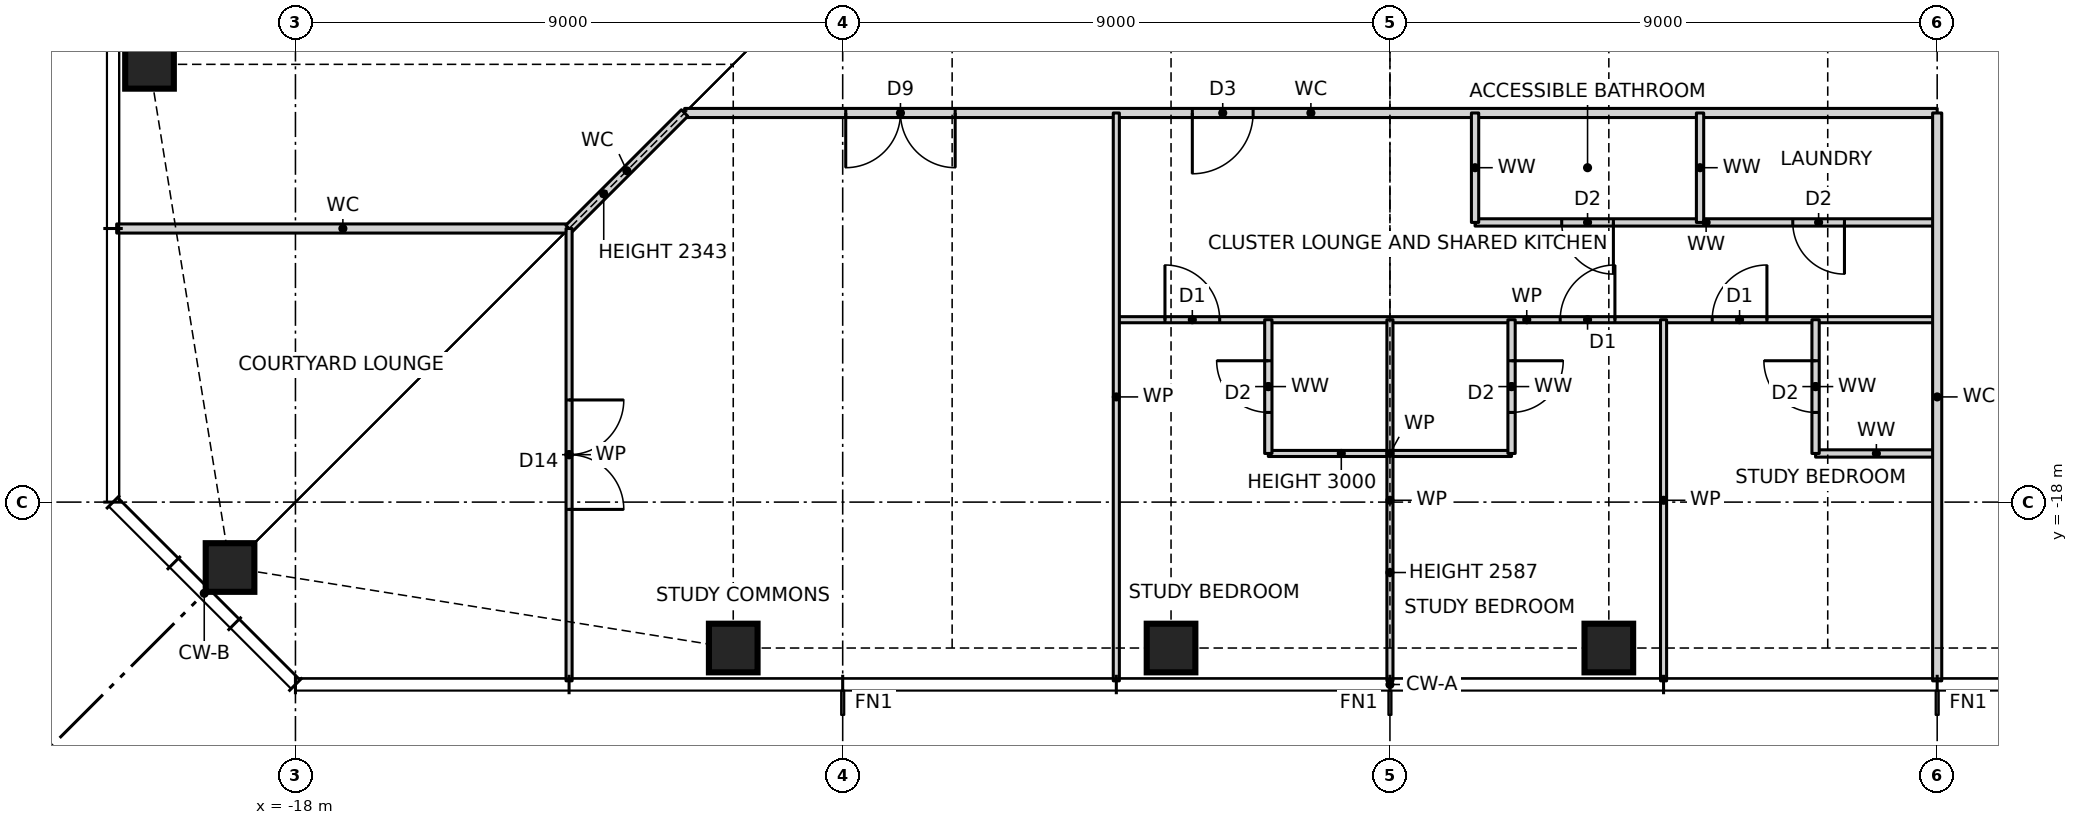
"""IFC4 building model, lengths in metres.
Left out: names, types, materials, properties, quantities, classifications, styles, units other than length and angle.
Written with IfcOpenShell. Run it as: python <this file> out.ifc"""

import sys

from ifc_helpers import new_model, si_unit, direction, frame, frame_2d, origin, origin_2d, place, context, subcontext, project, spatial, rectangle, hollow_rectangle, extrude, element, fill, save


model = new_model("IFC4")
c1 = context("Model", 3, precision=1e-05, world=origin(), true_north=direction((0.0, 1.0)))
c2 = subcontext(c1, "Body", "Model", "MODEL_VIEW")
j1 = project(units=[si_unit("LENGTHUNIT", "METRE"), si_unit("PLANEANGLEUNIT", "RADIAN")], contexts=[c1])
p1 = place(None, origin())
s1 = spatial("IfcSite", under=j1, at=p1, CompositionType="ELEMENT")
p2 = place(p1, origin())
s2 = spatial("IfcBuilding", under=s1, at=p2, CompositionType="ELEMENT")
p3 = place(p2, frame((0.0, 0.0, 133.0)))
s3 = spatial("IfcBuildingStorey", under=s2, at=p3, CompositionType="ELEMENT", Elevation=133.0)
for number, where, z_axis, x_axis in (
    (1, (-19.076, -19.076, 0.0), (0.0, 0.0, 1.0), (1.0, 0.0, 0.0)),
    (2, (-10.8, -20.4, 0.0), (0.0, 0.0, 1.0), (1.0, 0.0, 0.0)),
    (3, (-3.6, -20.4, 0.0), (0.0, 0.0, 1.0), (1.0, 0.0, 0.0)),
    (4, (3.6, -20.4, 0.0), (0.0, 0.0, 1.0), (1.0, 0.0, 0.0)),
    (5, (-20.4, -10.8, 0.0), (0.0, 0.0, 1.0), (1.0, 0.0, 0.0)),
):
    element("IfcColumn", number, at=place(p3, frame(where, z_axis=z_axis, x_axis=x_axis)), inside=s3, PredefinedType="COLUMN", context=c2, shape_type="SweptSolid", body=[
        extrude(hollow_rectangle(XDim=0.8, YDim=0.8, WallThickness=0.07, at=origin_2d()), origin(), (0.0, 0.0, 1.0), 3.5),
    ])
p4 = place(p3, frame((-2.0, -17.2, 0.0), z_axis=(0.0, 0.0, 1.0), x_axis=(1.0, 0.0, 0.0)))
e6 = element("IfcWall", 6, at=p4, inside=s3, PredefinedType="PARTITIONING", context=c2, shape_type="SweptSolid", body=[
    extrude(rectangle(XDim=4.0, YDim=0.1, at=frame_2d((2.0, 0.0))), origin(), (0.0, 0.0, 1.0), 3.0),
])
p5 = place(p3, frame((7.0, -17.2, 0.0), z_axis=(0.0, 0.0, 1.0), x_axis=(1.0, 0.0, 0.0)))
e7 = element("IfcWall", 7, at=p5, inside=s3, PredefinedType="PARTITIONING", context=c2, shape_type="SweptSolid", body=[
    extrude(rectangle(XDim=2.0, YDim=0.12, at=frame_2d((1.0, 0.0))), origin(), (0.0, 0.0, 1.0), 3.27),
])
p6 = place(p3, frame((-4.5, -15.0, 0.0), z_axis=(0.0, 0.0, 1.0), x_axis=(1.0, 0.0, 0.0)))
e8 = element("IfcWall", 8, at=p6, inside=s3, PredefinedType="PARTITIONING", context=c2, shape_type="SweptSolid", body=[
    extrude(rectangle(XDim=13.5, YDim=0.1, at=frame_2d((6.75, 0.0))), origin(), (0.0, 0.0, 1.0), 3.27),
])
p7 = place(p6, frame((0.8, 0.0, 0.0)))
e9 = element("IfcOpeningElement", 9, at=p7, cuts=e8, PredefinedType="OPENING", context=c2, shape_type="SweptSolid", body=[
    extrude(rectangle(XDim=0.9, YDim=2.1, at=frame_2d((0.45, 1.05))), frame((0.0, 0.06, 0.0), z_axis=(0.0, -1.0, 0.0), x_axis=(1.0, 0.0, 0.0)), (0.0, 0.0, 1.0), 0.12),
])
p8 = place(p6, frame((7.3, 0.0, 0.0)))
e10 = element("IfcOpeningElement", 10, at=p8, cuts=e8, PredefinedType="OPENING", context=c2, shape_type="SweptSolid", body=[
    extrude(rectangle(XDim=0.9, YDim=2.1, at=frame_2d((0.45, 1.05))), frame((0.0, 0.06, 0.0), z_axis=(0.0, -1.0, 0.0), x_axis=(1.0, 0.0, 0.0)), (0.0, 0.0, 1.0), 0.12),
])
p9 = place(p6, frame((9.8, 0.0, 0.0)))
e11 = element("IfcOpeningElement", 11, at=p9, cuts=e8, PredefinedType="OPENING", context=c2, shape_type="SweptSolid", body=[
    extrude(rectangle(XDim=0.9, YDim=2.1, at=frame_2d((0.45, 1.05))), frame((0.0, 0.06, 0.0), z_axis=(0.0, -1.0, 0.0), x_axis=(1.0, 0.0, 0.0)), (0.0, 0.0, 1.0), 0.12),
])
p10 = place(p3, frame((-20.94, -13.5, 0.0), z_axis=(0.0, 0.0, 1.0), x_axis=(1.0, 0.0, 0.0)))
e12 = element("IfcWall", 12, at=p10, inside=s3, PredefinedType="PARTITIONING", context=c2, shape_type="SweptSolid", body=[
    extrude(rectangle(XDim=7.44, YDim=0.15, at=frame_2d((3.72, 0.0))), origin(), (0.0, 0.0, 1.0), 3.27),
])
p11 = place(p3, frame((1.4, -13.4, 0.0), z_axis=(0.0, 0.0, 1.0), x_axis=(1.0, 0.0, 0.0)))
e13 = element("IfcWall", 13, at=p11, inside=s3, PredefinedType="PARTITIONING", context=c2, shape_type="SweptSolid", body=[
    extrude(rectangle(XDim=7.6, YDim=0.12, at=frame_2d((3.8, 0.0))), origin(), (0.0, 0.0, 1.0), 3.27),
])
p12 = place(p11, frame((1.425, 0.0, 0.0)))
e14 = element("IfcOpeningElement", 14, at=p12, cuts=e13, PredefinedType="OPENING", context=c2, shape_type="SweptSolid", body=[
    extrude(rectangle(XDim=0.85, YDim=2.1, at=frame_2d((0.425, 1.05))), frame((0.0, 0.07, 0.0), z_axis=(0.0, -1.0, 0.0), x_axis=(1.0, 0.0, 0.0)), (0.0, 0.0, 1.0), 0.14),
])
p13 = place(p11, frame((5.225, 0.0, 0.0)))
e15 = element("IfcOpeningElement", 15, at=p13, cuts=e13, PredefinedType="OPENING", context=c2, shape_type="SweptSolid", body=[
    extrude(rectangle(XDim=0.85, YDim=2.1, at=frame_2d((0.425, 1.05))), frame((0.0, 0.07, 0.0), z_axis=(0.0, -1.0, 0.0), x_axis=(1.0, 0.0, 0.0)), (0.0, 0.0, 1.0), 0.14),
])
p14 = place(p3, frame((-11.6, -11.6, 0.0), z_axis=(0.0, 0.0, 1.0), x_axis=(1.0, 0.0, 0.0)))
e16 = element("IfcWall", 16, at=p14, inside=s3, PredefinedType="PARTITIONING", context=c2, shape_type="SweptSolid", body=[
    extrude(rectangle(XDim=20.6, YDim=0.15, at=frame_2d((10.3, 0.0))), origin(), (0.0, 0.0, 1.0), 3.27),
])
p15 = place(p14, frame((2.65, 0.0, 0.0)))
e17 = element("IfcOpeningElement", 17, at=p15, cuts=e16, PredefinedType="OPENING", context=c2, shape_type="SweptSolid", body=[
    extrude(rectangle(XDim=1.8, YDim=2.1, at=frame_2d((0.9, 1.05))), frame((0.0, 0.085, 0.0), z_axis=(0.0, -1.0, 0.0), x_axis=(1.0, 0.0, 0.0)), (0.0, 0.0, 1.0), 0.17),
])
p16 = place(p14, frame((8.35, 0.0, 0.0)))
e18 = element("IfcOpeningElement", 18, at=p16, cuts=e16, PredefinedType="OPENING", context=c2, shape_type="SweptSolid", body=[
    extrude(rectangle(XDim=1.0, YDim=2.1, at=frame_2d((0.5, 1.05))), frame((0.0, 0.085, 0.0), z_axis=(0.0, -1.0, 0.0), x_axis=(1.0, 0.0, 0.0)), (0.0, 0.0, 1.0), 0.17),
])
p17 = place(p3, frame((-13.5, -13.5, 0.0), z_axis=(0.0, 0.0, 1.0), x_axis=(0.707106781187, 0.707106781187, 0.0)))
e19 = element("IfcWall", 19, at=p17, inside=s3, PredefinedType="PARTITIONING", context=c2, shape_type="SweptSolid", body=[
    extrude(rectangle(XDim=2.687, YDim=0.15, at=frame_2d((1.343, 0.0))), origin(), (0.0, 0.0, 1.0), 2.343),
])
p18 = place(p3, frame((9.0, -20.94, 0.0), z_axis=(0.0, 0.0, 1.0), x_axis=(0.0, 1.0, 0.0)))
e20 = element("IfcWall", 20, at=p18, inside=s3, PredefinedType="PARTITIONING", context=c2, shape_type="SweptSolid", body=[
    extrude(rectangle(XDim=9.34, YDim=0.15, at=frame_2d((4.67, 0.0))), origin(), (0.0, 0.0, 1.0), 3.27),
])
p19 = place(p3, frame((7.0, -17.2, 0.0), z_axis=(0.0, 0.0, 1.0), x_axis=(0.0, 1.0, 0.0)))
e21 = element("IfcWall", 21, at=p19, inside=s3, PredefinedType="PARTITIONING", context=c2, shape_type="SweptSolid", body=[
    extrude(rectangle(XDim=2.2, YDim=0.12, at=frame_2d((1.1, 0.0))), origin(), (0.0, 0.0, 1.0), 3.27),
])
p20 = place(p19, frame((0.675, 0.0, 0.0)))
e22 = element("IfcOpeningElement", 22, at=p20, cuts=e21, PredefinedType="OPENING", context=c2, shape_type="SweptSolid", body=[
    extrude(rectangle(XDim=0.85, YDim=2.1, at=frame_2d((0.425, 1.05))), frame((0.0, 0.07, 0.0), z_axis=(0.0, -1.0, 0.0), x_axis=(1.0, 0.0, 0.0)), (0.0, 0.0, 1.0), 0.14),
])
p21 = place(p3, frame((5.1, -13.4, 0.0), z_axis=(0.0, 0.0, 1.0), x_axis=(0.0, 1.0, 0.0)))
e23 = element("IfcWall", 23, at=p21, inside=s3, PredefinedType="PARTITIONING", context=c2, shape_type="SweptSolid", body=[
    extrude(rectangle(XDim=1.8, YDim=0.12, at=frame_2d((0.9, 0.0))), origin(), (0.0, 0.0, 1.0), 3.27),
])
p22 = place(p3, frame((4.5, -20.94, 0.0), z_axis=(0.0, 0.0, 1.0), x_axis=(0.0, 1.0, 0.0)))
e24 = element("IfcWall", 24, at=p22, inside=s3, PredefinedType="PARTITIONING", context=c2, shape_type="SweptSolid", body=[
    extrude(rectangle(XDim=5.94, YDim=0.1, at=frame_2d((2.97, 0.0))), origin(), (0.0, 0.0, 1.0), 3.27),
])
p23 = place(p3, frame((2.0, -17.2, 0.0), z_axis=(0.0, 0.0, 1.0), x_axis=(0.0, 1.0, 0.0)))
e25 = element("IfcWall", 25, at=p23, inside=s3, PredefinedType="PARTITIONING", context=c2, shape_type="SweptSolid", body=[
    extrude(rectangle(XDim=2.2, YDim=0.12, at=frame_2d((1.1, 0.0))), origin(), (0.0, 0.0, 1.0), 3.27),
])
p24 = place(p23, frame((0.675, 0.0, 0.0)))
e26 = element("IfcOpeningElement", 26, at=p24, cuts=e25, PredefinedType="OPENING", context=c2, shape_type="SweptSolid", body=[
    extrude(rectangle(XDim=0.85, YDim=2.1, at=frame_2d((0.425, 1.05))), frame((0.0, 0.07, 0.0), z_axis=(0.0, -1.0, 0.0), x_axis=(1.0, 0.0, 0.0)), (0.0, 0.0, 1.0), 0.14),
])
p25 = place(p3, frame((1.4, -13.4, 0.0), z_axis=(0.0, 0.0, 1.0), x_axis=(0.0, 1.0, 0.0)))
e27 = element("IfcWall", 27, at=p25, inside=s3, PredefinedType="PARTITIONING", context=c2, shape_type="SweptSolid", body=[
    extrude(rectangle(XDim=1.8, YDim=0.12, at=frame_2d((0.9, 0.0))), origin(), (0.0, 0.0, 1.0), 3.27),
])
p26 = place(p3, frame((0.0, -20.94, 0.0), z_axis=(0.0, 0.0, 1.0), x_axis=(0.0, 1.0, 0.0)))
e28 = element("IfcWall", 28, at=p26, inside=s3, PredefinedType="PARTITIONING", context=c2, shape_type="SweptSolid", body=[
    extrude(rectangle(XDim=5.94, YDim=0.1, at=frame_2d((2.97, 0.0))), origin(), (0.0, 0.0, 1.0), 2.587),
])
p27 = place(p3, frame((-2.0, -17.2, 0.0), z_axis=(0.0, 0.0, 1.0), x_axis=(0.0, 1.0, 0.0)))
e29 = element("IfcWall", 29, at=p27, inside=s3, PredefinedType="PARTITIONING", context=c2, shape_type="SweptSolid", body=[
    extrude(rectangle(XDim=2.2, YDim=0.12, at=frame_2d((1.1, 0.0))), origin(), (0.0, 0.0, 1.0), 3.27),
])
p28 = place(p27, frame((0.675, 0.0, 0.0)))
e30 = element("IfcOpeningElement", 30, at=p28, cuts=e29, PredefinedType="OPENING", context=c2, shape_type="SweptSolid", body=[
    extrude(rectangle(XDim=0.85, YDim=2.1, at=frame_2d((0.425, 1.05))), frame((0.0, 0.07, 0.0), z_axis=(0.0, -1.0, 0.0), x_axis=(1.0, 0.0, 0.0)), (0.0, 0.0, 1.0), 0.14),
])
p29 = place(p3, frame((-4.5, -20.94, 0.0), z_axis=(0.0, 0.0, 1.0), x_axis=(0.0, 1.0, 0.0)))
e31 = element("IfcWall", 31, at=p29, inside=s3, PredefinedType="PARTITIONING", context=c2, shape_type="SweptSolid", body=[
    extrude(rectangle(XDim=9.34, YDim=0.1, at=frame_2d((4.67, 0.0))), origin(), (0.0, 0.0, 1.0), 3.27),
])
p30 = place(p3, frame((-13.5, -20.94, 0.0), z_axis=(0.0, 0.0, 1.0), x_axis=(0.0, 1.0, 0.0)))
e32 = element("IfcWall", 32, at=p30, inside=s3, PredefinedType="PARTITIONING", context=c2, shape_type="SweptSolid", body=[
    extrude(rectangle(XDim=7.44, YDim=0.1, at=frame_2d((3.72, 0.0))), origin(), (0.0, 0.0, 1.0), 3.27),
])
p31 = place(p30, frame((2.82, 0.0, 0.0)))
e33 = element("IfcOpeningElement", 33, at=p31, cuts=e32, PredefinedType="OPENING", context=c2, shape_type="SweptSolid", body=[
    extrude(rectangle(XDim=1.8, YDim=2.1, at=frame_2d((0.9, 1.05))), frame((0.0, 0.06, 0.0), z_axis=(0.0, -1.0, 0.0), x_axis=(1.0, 0.0, 0.0)), (0.0, 0.0, 1.0), 0.12),
])
p32 = place(p15, frame((1.8, 0.0, 0.0), z_axis=(0.0, 0.0, 1.0), x_axis=(-1.0, 0.0, 0.0)))
e34 = element("IfcDoor", 34, at=p32, inside=s3, OperationType="DOUBLE_DOOR_SINGLE_SWING", PredefinedType="DOOR", context=c2, shape_type="SweptSolid", body=[
    extrude(rectangle(XDim=1.8, YDim=2.1, at=frame_2d((0.9, 1.05))), frame((0.0, 0.025, 0.0), z_axis=(0.0, -1.0, 0.0), x_axis=(1.0, 0.0, 0.0)), (0.0, 0.0, 1.0), 0.05),
])
fill(e17, e34)
p33 = place(p28, origin())
e35 = element("IfcDoor", 35, at=p33, inside=s3, OperationType="SINGLE_SWING_RIGHT", PredefinedType="DOOR", context=c2, shape_type="SweptSolid", body=[
    extrude(rectangle(XDim=0.85, YDim=2.1, at=frame_2d((0.425, 1.05))), frame((0.0, 0.025, 0.0), z_axis=(0.0, -1.0, 0.0), x_axis=(1.0, 0.0, 0.0)), (0.0, 0.0, 1.0), 0.05),
])
fill(e30, e35)
p34 = place(p7, origin())
e36 = element("IfcDoor", 36, at=p34, inside=s3, OperationType="SINGLE_SWING_LEFT", PredefinedType="DOOR", context=c2, shape_type="SweptSolid", body=[
    extrude(rectangle(XDim=0.9, YDim=2.1, at=frame_2d((0.45, 1.05))), frame((0.0, 0.025, 0.0), z_axis=(0.0, -1.0, 0.0), x_axis=(1.0, 0.0, 0.0)), (0.0, 0.0, 1.0), 0.05),
])
fill(e9, e36)
p35 = place(p24, frame((0.85, 0.0, 0.0), z_axis=(0.0, 0.0, 1.0), x_axis=(-1.0, 0.0, 0.0)))
e37 = element("IfcDoor", 37, at=p35, inside=s3, OperationType="SINGLE_SWING_LEFT", PredefinedType="DOOR", context=c2, shape_type="SweptSolid", body=[
    extrude(rectangle(XDim=0.85, YDim=2.1, at=frame_2d((0.425, 1.05))), frame((0.0, 0.025, 0.0), z_axis=(0.0, -1.0, 0.0), x_axis=(1.0, 0.0, 0.0)), (0.0, 0.0, 1.0), 0.05),
])
fill(e26, e37)
p36 = place(p8, origin())
e38 = element("IfcDoor", 38, at=p36, inside=s3, OperationType="SINGLE_SWING_RIGHT", PredefinedType="DOOR", context=c2, shape_type="SweptSolid", body=[
    extrude(rectangle(XDim=0.9, YDim=2.1, at=frame_2d((0.45, 1.05))), frame((0.0, 0.025, 0.0), z_axis=(0.0, -1.0, 0.0), x_axis=(1.0, 0.0, 0.0)), (0.0, 0.0, 1.0), 0.05),
])
fill(e10, e38)
p37 = place(p20, origin())
e39 = element("IfcDoor", 39, at=p37, inside=s3, OperationType="SINGLE_SWING_RIGHT", PredefinedType="DOOR", context=c2, shape_type="SweptSolid", body=[
    extrude(rectangle(XDim=0.85, YDim=2.1, at=frame_2d((0.425, 1.05))), frame((0.0, 0.025, 0.0), z_axis=(0.0, -1.0, 0.0), x_axis=(1.0, 0.0, 0.0)), (0.0, 0.0, 1.0), 0.05),
])
fill(e22, e39)
p38 = place(p9, origin())
e40 = element("IfcDoor", 40, at=p38, inside=s3, OperationType="SINGLE_SWING_RIGHT", PredefinedType="DOOR", context=c2, shape_type="SweptSolid", body=[
    extrude(rectangle(XDim=0.9, YDim=2.1, at=frame_2d((0.45, 1.05))), frame((0.0, 0.025, 0.0), z_axis=(0.0, -1.0, 0.0), x_axis=(1.0, 0.0, 0.0)), (0.0, 0.0, 1.0), 0.05),
])
fill(e11, e40)
p39 = place(p16, frame((1.0, 0.0, 0.0), z_axis=(0.0, 0.0, 1.0), x_axis=(-1.0, 0.0, 0.0)))
e41 = element("IfcDoor", 41, at=p39, inside=s3, OperationType="SINGLE_SWING_RIGHT", PredefinedType="DOOR", context=c2, shape_type="SweptSolid", body=[
    extrude(rectangle(XDim=1.0, YDim=2.1, at=frame_2d((0.5, 1.05))), frame((0.0, 0.025, 0.0), z_axis=(0.0, -1.0, 0.0), x_axis=(1.0, 0.0, 0.0)), (0.0, 0.0, 1.0), 0.05),
])
fill(e18, e41)
p40 = place(p12, frame((0.85, 0.0, 0.0), z_axis=(0.0, 0.0, 1.0), x_axis=(-1.0, 0.0, 0.0)))
e42 = element("IfcDoor", 42, at=p40, inside=s3, OperationType="SINGLE_SWING_LEFT", PredefinedType="DOOR", context=c2, shape_type="SweptSolid", body=[
    extrude(rectangle(XDim=0.85, YDim=2.1, at=frame_2d((0.425, 1.05))), frame((0.0, 0.025, 0.0), z_axis=(0.0, -1.0, 0.0), x_axis=(1.0, 0.0, 0.0)), (0.0, 0.0, 1.0), 0.05),
])
fill(e14, e42)
p41 = place(p13, frame((0.85, 0.0, 0.0), z_axis=(0.0, 0.0, 1.0), x_axis=(-1.0, 0.0, 0.0)))
e43 = element("IfcDoor", 43, at=p41, inside=s3, OperationType="SINGLE_SWING_LEFT", PredefinedType="DOOR", context=c2, shape_type="SweptSolid", body=[
    extrude(rectangle(XDim=0.85, YDim=2.1, at=frame_2d((0.425, 1.05))), frame((0.0, 0.025, 0.0), z_axis=(0.0, -1.0, 0.0), x_axis=(1.0, 0.0, 0.0)), (0.0, 0.0, 1.0), 0.05),
])
fill(e15, e43)
p42 = place(p31, frame((1.8, 0.0, 0.0), z_axis=(0.0, 0.0, 1.0), x_axis=(-1.0, 0.0, 0.0)))
e44 = element("IfcDoor", 44, at=p42, inside=s3, OperationType="DOUBLE_DOOR_SINGLE_SWING", PredefinedType="DOOR", context=c2, shape_type="SweptSolid", body=[
    extrude(rectangle(XDim=1.8, YDim=2.1, at=frame_2d((0.9, 1.05))), frame((0.0, 0.025, 0.0), z_axis=(0.0, -1.0, 0.0), x_axis=(1.0, 0.0, 0.0)), (0.0, 0.0, 1.0), 0.05),
])
fill(e33, e44)
save(model, sys.argv[1])
